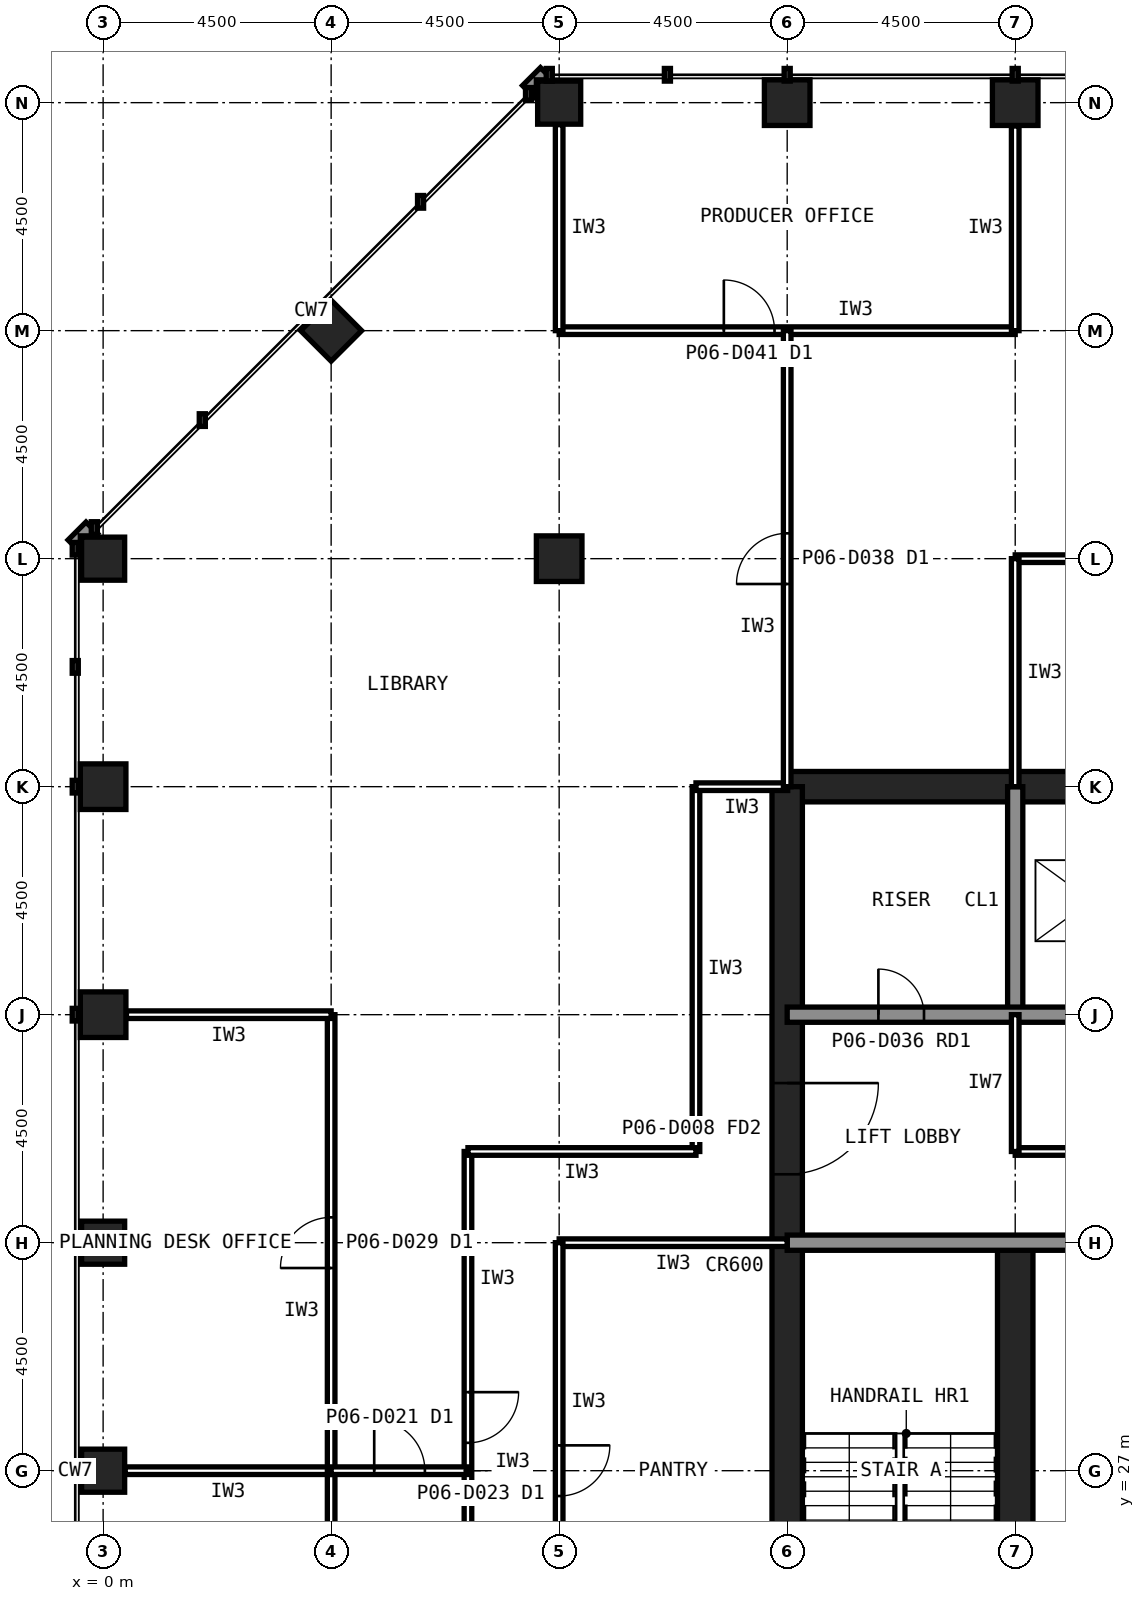
"""IFC4 building model, lengths in metres.
Left out: names, types, materials, properties, quantities, classifications, styles, units other than length and angle.
Written with IfcOpenShell. Run it as: python <this file> out.ifc"""

import sys

from ifc_helpers import new_model, si_unit, direction, frame, frame_2d, origin, origin_2d, place, context, subcontext, project, spatial, rectangle, hollow_rectangle, extrude, element, fill, save


model = new_model("IFC4")
c1 = context("Model", 3, precision=1e-05, world=origin(), true_north=direction((0.0, 1.0)))
c2 = subcontext(c1, "Body", "Model", "MODEL_VIEW")
j1 = project(units=[si_unit("LENGTHUNIT", "METRE"), si_unit("PLANEANGLEUNIT", "RADIAN")], contexts=[c1])
p1 = place(None, origin())
s1 = spatial("IfcSite", under=j1, at=p1, CompositionType="ELEMENT")
p2 = place(p1, origin())
s2 = spatial("IfcBuilding", under=s1, at=p2, CompositionType="ELEMENT")
p3 = place(p2, frame((0.0, 0.0, 29.0)))
s3 = spatial("IfcBuildingStorey", under=s2, at=p3, CompositionType="ELEMENT", Elevation=29.0)
for number, where, z_axis, x_axis in (
    (1, (18.0, 54.0, 0.0), (0.0, 0.0, 1.0), (1.0, 0.0, 0.0)),
    (2, (13.5, 54.0, 0.0), (0.0, 0.0, 1.0), (1.0, 0.0, 0.0)),
):
    element("IfcColumn", number, at=place(p3, frame(where, z_axis=z_axis, x_axis=x_axis)), inside=s3, PredefinedType="COLUMN", context=c2, shape_type="SweptSolid", body=[
        extrude(hollow_rectangle(XDim=0.9, YDim=0.9, WallThickness=0.063, at=origin_2d()), origin(), (0.0, 0.0, 1.0), 4.2),
    ])
for number, where, z_axis, x_axis in (
    (3, (9.0, 54.0, 0.0), (0.0, 0.0, 1.0), (1.0, 0.0, 0.0)),
    (4, (0.0, 45.0, 0.0), (0.0, 0.0, 1.0), (1.0, 0.0, 0.0)),
):
    element("IfcColumn", number, at=place(p3, frame(where, z_axis=z_axis, x_axis=x_axis)), inside=s3, PredefinedType="COLUMN", context=c2, shape_type="SweptSolid", body=[
        extrude(hollow_rectangle(XDim=0.85, YDim=0.85, WallThickness=0.05, at=origin_2d()), origin(), (0.0, 0.0, 1.0), 4.2),
    ])
for number, where, z_axis, x_axis in (
    (5, (0.0, 40.5, 0.0), (0.0, 0.0, 1.0), (1.0, 0.0, 0.0)),
    (6, (0.0, 36.0, 0.0), (0.0, 0.0, 1.0), (1.0, 0.0, 0.0)),
):
    element("IfcColumn", number, at=place(p3, frame(where, z_axis=z_axis, x_axis=x_axis)), inside=s3, PredefinedType="COLUMN", context=c2, shape_type="SweptSolid", body=[
        extrude(hollow_rectangle(XDim=0.9, YDim=0.9, WallThickness=0.063, at=origin_2d()), origin(), (0.0, 0.0, 1.0), 4.2),
    ])
for number, where, z_axis, x_axis in (
    (7, (0.0, 31.5, 0.0), (0.0, 0.0, 1.0), (1.0, 0.0, 0.0)),
    (8, (0.0, 27.0, 0.0), (0.0, 0.0, 1.0), (1.0, 0.0, 0.0)),
    (9, (4.5, 49.5, 0.0), (0.0, 0.0, 1.0), (0.707, 0.707, 0.0)),
):
    element("IfcColumn", number, at=place(p3, frame(where, z_axis=z_axis, x_axis=x_axis)), inside=s3, PredefinedType="COLUMN", context=c2, shape_type="SweptSolid", body=[
        extrude(hollow_rectangle(XDim=0.85, YDim=0.85, WallThickness=0.05, at=origin_2d()), origin(), (0.0, 0.0, 1.0), 4.2),
    ])
p4 = place(p3, frame((9.0, 45.0, 0.0), z_axis=(0.0, 0.0, 1.0), x_axis=(1.0, 0.0, 0.0)))
e10 = element("IfcColumn", 10, at=p4, inside=s3, PredefinedType="COLUMN", context=c2, shape_type="SweptSolid", body=[
    extrude(hollow_rectangle(XDim=0.9, YDim=0.9, WallThickness=0.063, at=origin_2d()), origin(), (0.0, 0.0, 1.0), 4.2),
])
p5 = place(p3, frame((40.5, 40.5, 0.0), z_axis=(0.0, 0.0, 1.0), x_axis=(-1.0, 0.0, 0.0)))
e11 = element("IfcWall", 11, at=p5, inside=s3, PredefinedType="SHEAR", context=c2, shape_type="SweptSolid", body=[
    extrude(rectangle(XDim=27.0, YDim=0.6, at=frame_2d((13.5, 0.0))), origin(), (0.0, 0.0, 1.0), 4.2),
])
p6 = place(p3, frame((13.5, 40.5, 0.0), z_axis=(0.0, 0.0, 1.0), x_axis=(0.0, -1.0, 0.0)))
e12 = element("IfcWall", 12, at=p6, inside=s3, PredefinedType="SHEAR", context=c2, shape_type="SweptSolid", body=[
    extrude(rectangle(XDim=27.0, YDim=0.6, at=frame_2d((13.5, 0.0))), origin(), (0.0, 0.0, 1.0), 4.2),
])
p7 = place(p6, frame((19.65, 0.0, 0.0)))
e13 = element("IfcOpeningElement", 13, at=p7, cuts=e12, PredefinedType="OPENING", context=c2, shape_type="SweptSolid", body=[
    extrude(rectangle(XDim=1.2, YDim=2.1, at=frame_2d((0.6, 1.05))), frame((0.0, 0.31, 0.0), z_axis=(0.0, -1.0, 0.0), x_axis=(1.0, 0.0, 0.0)), (0.0, 0.0, 1.0), 0.62),
])
p8 = place(p6, frame((5.85, 0.0, 0.0)))
e14 = element("IfcOpeningElement", 14, at=p8, cuts=e12, PredefinedType="OPENING", context=c2, shape_type="SweptSolid", body=[
    extrude(rectangle(XDim=1.8, YDim=2.1, at=frame_2d((0.9, 1.05))), frame((0.0, 0.31, 0.0), z_axis=(0.0, -1.0, 0.0), x_axis=(1.0, 0.0, 0.0)), (0.0, 0.0, 1.0), 0.62),
])
p9 = place(p3, frame((18.0, 13.5, 0.0), z_axis=(0.0, 0.0, 1.0), x_axis=(0.0, 1.0, 0.0)))
e15 = element("IfcWall", 15, at=p9, inside=s3, PredefinedType="SHEAR", context=c2, shape_type="SweptSolid", body=[
    extrude(rectangle(XDim=18.0, YDim=0.7, at=frame_2d((9.0, 0.0))), origin(), (0.0, 0.0, 1.0), 4.2),
])
p10 = place(p3, frame((18.0, 36.0, 0.0), z_axis=(0.0, 0.0, 1.0), x_axis=(0.0, 1.0, 0.0)))
e16 = element("IfcWall", 16, at=p10, inside=s3, PredefinedType="SOLIDWALL", context=c2, shape_type="SweptSolid", body=[
    extrude(rectangle(XDim=4.5, YDim=0.3, at=frame_2d((2.25, 0.0))), origin(), (0.0, 0.0, 1.0), 4.04),
])
p11 = place(p3, frame((13.5, 36.0, 0.0), z_axis=(0.0, 0.0, 1.0), x_axis=(1.0, 0.0, 0.0)))
e17 = element("IfcWall", 17, at=p11, inside=s3, PredefinedType="SOLIDWALL", context=c2, shape_type="SweptSolid", body=[
    extrude(rectangle(XDim=27.0, YDim=0.3, at=frame_2d((13.5, 0.0))), origin(), (0.0, 0.0, 1.0), 4.04),
])
p12 = place(p11, frame((1.8, 0.0, 0.0)))
e18 = element("IfcOpeningElement", 18, at=p12, cuts=e17, PredefinedType="OPENING", context=c2, shape_type="SweptSolid", body=[
    extrude(rectangle(XDim=0.9, YDim=2.1, at=frame_2d((0.45, 1.05))), frame((0.0, 0.16, 0.0), z_axis=(0.0, -1.0, 0.0), x_axis=(1.0, 0.0, 0.0)), (0.0, 0.0, 1.0), 0.32),
])
p13 = place(p11, frame((24.1, 0.0, 0.0)))
e19 = element("IfcOpeningElement", 19, at=p13, cuts=e17, PredefinedType="OPENING", context=c2, shape_type="SweptSolid", body=[
    extrude(rectangle(XDim=1.3, YDim=2.2, at=frame_2d((0.65, 1.1))), frame((0.0, 0.16, 0.0), z_axis=(0.0, -1.0, 0.0), x_axis=(1.0, 0.0, 0.0)), (0.0, 0.0, 1.0), 0.32),
])
p14 = place(p3, frame((13.5, 31.5, 0.0), z_axis=(0.0, 0.0, 1.0), x_axis=(1.0, 0.0, 0.0)))
e20 = element("IfcWall", 20, at=p14, inside=s3, PredefinedType="SOLIDWALL", context=c2, shape_type="SweptSolid", body=[
    extrude(rectangle(XDim=27.0, YDim=0.3, at=frame_2d((13.5, 0.0))), origin(), (0.0, 0.0, 1.0), 4.04),
])
p15 = place(p14, frame((24.15, 0.0, 0.0)))
e21 = element("IfcOpeningElement", 21, at=p15, cuts=e20, PredefinedType="OPENING", context=c2, shape_type="SweptSolid", body=[
    extrude(rectangle(XDim=1.2, YDim=2.1, at=frame_2d((0.6, 1.05))), frame((0.0, 0.16, 0.0), z_axis=(0.0, -1.0, 0.0), x_axis=(1.0, 0.0, 0.0)), (0.0, 0.0, 1.0), 0.32),
])
p16 = place(p14, frame((15.3, 0.0, 0.0)))
e22 = element("IfcOpeningElement", 22, at=p16, cuts=e20, PredefinedType="OPENING", context=c2, shape_type="SweptSolid", body=[
    extrude(rectangle(XDim=0.9, YDim=2.1, at=frame_2d((0.45, 1.05))), frame((0.0, 0.16, 0.0), z_axis=(0.0, -1.0, 0.0), x_axis=(1.0, 0.0, 0.0)), (0.0, 0.0, 1.0), 0.32),
])
p17 = place(p14, frame((19.8, 0.0, 0.0)))
e23 = element("IfcOpeningElement", 23, at=p17, cuts=e20, PredefinedType="OPENING", context=c2, shape_type="SweptSolid", body=[
    extrude(rectangle(XDim=0.9, YDim=2.1, at=frame_2d((0.45, 1.05))), frame((0.0, 0.16, 0.0), z_axis=(0.0, -1.0, 0.0), x_axis=(1.0, 0.0, 0.0)), (0.0, 0.0, 1.0), 0.32),
])
p18 = place(p3, frame((18.0, 33.3, 0.0), z_axis=(0.0, 0.0, 1.0), x_axis=(1.0, 0.0, 0.0)))
e24 = element("IfcWall", 24, at=p18, inside=s3, PredefinedType="PARTITIONING", context=c2, shape_type="SweptSolid", body=[
    extrude(rectangle(XDim=18.0, YDim=0.15, at=frame_2d((9.0, 0.0))), origin(), (0.0, 0.0, 1.0), 4.04),
])
p19 = place(p18, frame((5.55, 0.0, 0.0)))
e25 = element("IfcOpeningElement", 25, at=p19, cuts=e24, PredefinedType="OPENING", context=c2, shape_type="SweptSolid", body=[
    extrude(rectangle(XDim=0.9, YDim=2.1, at=frame_2d((0.45, 1.05))), frame((0.0, 0.085, 0.0), z_axis=(0.0, -1.0, 0.0), x_axis=(1.0, 0.0, 0.0)), (0.0, 0.0, 1.0), 0.17),
])
p20 = place(p18, frame((14.55, 0.0, 0.0)))
e26 = element("IfcOpeningElement", 26, at=p20, cuts=e24, PredefinedType="OPENING", context=c2, shape_type="SweptSolid", body=[
    extrude(rectangle(XDim=0.9, YDim=2.1, at=frame_2d((0.45, 1.05))), frame((0.0, 0.085, 0.0), z_axis=(0.0, -1.0, 0.0), x_axis=(1.0, 0.0, 0.0)), (0.0, 0.0, 1.0), 0.17),
])
p21 = place(p3, frame((18.0, 33.3, 0.0), z_axis=(0.0, 0.0, 1.0), x_axis=(0.0, 1.0, 0.0)))
e27 = element("IfcWall", 27, at=p21, inside=s3, PredefinedType="PARTITIONING", context=c2, shape_type="SweptSolid", body=[
    extrude(rectangle(XDim=2.7, YDim=0.15, at=frame_2d((1.35, 0.0))), origin(), (0.0, 0.0, 1.0), 4.04),
])
p22 = place(p3, frame((7.2, 33.3, 0.0), z_axis=(0.0, 0.0, 1.0), x_axis=(0.0, -1.0, 0.0)))
e28 = element("IfcWall", 28, at=p22, inside=s3, PredefinedType="PARTITIONING", context=c2, shape_type="SweptSolid", body=[
    extrude(rectangle(XDim=12.6, YDim=0.15, at=frame_2d((6.3, 0.0))), origin(), (0.0, 0.0, 1.0), 4.04),
])
p23 = place(p22, frame((4.75, 0.0, 0.0)))
e29 = element("IfcOpeningElement", 29, at=p23, cuts=e28, PredefinedType="OPENING", context=c2, shape_type="SweptSolid", body=[
    extrude(rectangle(XDim=1.0, YDim=2.1, at=frame_2d((0.5, 1.05))), frame((0.0, 0.085, 0.0), z_axis=(0.0, -1.0, 0.0), x_axis=(1.0, 0.0, 0.0)), (0.0, 0.0, 1.0), 0.17),
])
p24 = place(p3, frame((11.7, 40.5, 0.0), z_axis=(0.0, 0.0, 1.0), x_axis=(0.0, -1.0, 0.0)))
e30 = element("IfcWall", 30, at=p24, inside=s3, PredefinedType="PARTITIONING", context=c2, shape_type="SweptSolid", body=[
    extrude(rectangle(XDim=7.2, YDim=0.15, at=frame_2d((3.6, 0.0))), origin(), (0.0, 0.0, 1.0), 4.04),
])
p25 = place(p3, frame((11.7, 33.3, 0.0), z_axis=(0.0, 0.0, 1.0), x_axis=(-1.0, 0.0, 0.0)))
e31 = element("IfcWall", 31, at=p25, inside=s3, PredefinedType="PARTITIONING", context=c2, shape_type="SweptSolid", body=[
    extrude(rectangle(XDim=4.5, YDim=0.15, at=frame_2d((2.25, 0.0))), origin(), (0.0, 0.0, 1.0), 4.04),
])
p26 = place(p3, frame((13.51, 40.5, 0.0), z_axis=(0.0, 0.0, 1.0), x_axis=(-1.0, 0.0, 0.0)))
e32 = element("IfcWall", 32, at=p26, inside=s3, PredefinedType="PARTITIONING", context=c2, shape_type="SweptSolid", body=[
    extrude(rectangle(XDim=1.81, YDim=0.15, at=frame_2d((0.905, 0.0))), origin(), (0.0, 0.0, 1.0), 3.189),
])
p27 = place(p3, frame((27.0, 45.0, 0.0), z_axis=(0.0, 0.0, 1.0), x_axis=(-1.0, 0.0, 0.0)))
e33 = element("IfcWall", 33, at=p27, inside=s3, PredefinedType="PARTITIONING", context=c2, shape_type="SweptSolid", body=[
    extrude(rectangle(XDim=9.0, YDim=0.15, at=frame_2d((4.5, 0.0))), origin(), (0.0, 0.0, 1.0), 4.04),
])
p28 = place(p27, frame((4.0, 0.0, 0.0)))
e34 = element("IfcOpeningElement", 34, at=p28, cuts=e33, PredefinedType="OPENING", context=c2, shape_type="SweptSolid", body=[
    extrude(rectangle(XDim=1.0, YDim=2.1, at=frame_2d((0.5, 1.05))), frame((0.0, 0.085, 0.0), z_axis=(0.0, -1.0, 0.0), x_axis=(1.0, 0.0, 0.0)), (0.0, 0.0, 1.0), 0.17),
])
p29 = place(p3, frame((18.0, 45.0, 0.0), z_axis=(0.0, 0.0, 1.0), x_axis=(0.0, -1.0, 0.0)))
e35 = element("IfcWall", 35, at=p29, inside=s3, PredefinedType="PARTITIONING", context=c2, shape_type="SweptSolid", body=[
    extrude(rectangle(XDim=4.5, YDim=0.15, at=frame_2d((2.25, 0.0))), origin(), (0.0, 0.0, 1.0), 3.189),
])
p30 = place(p3, frame((4.5, 22.5, 0.0), z_axis=(0.0, 0.0, 1.0), x_axis=(0.0, 1.0, 0.0)))
e36 = element("IfcWall", 36, at=p30, inside=s3, PredefinedType="PARTITIONING", context=c2, shape_type="SweptSolid", body=[
    extrude(rectangle(XDim=4.5, YDim=0.15, at=frame_2d((2.25, 0.0))), origin(), (0.0, 0.0, 1.0), 4.04),
])
p31 = place(p30, frame((1.75, 0.0, 0.0)))
e37 = element("IfcOpeningElement", 37, at=p31, cuts=e36, PredefinedType="OPENING", context=c2, shape_type="SweptSolid", body=[
    extrude(rectangle(XDim=1.0, YDim=2.1, at=frame_2d((0.5, 1.05))), frame((0.0, 0.085, 0.0), z_axis=(0.0, -1.0, 0.0), x_axis=(1.0, 0.0, 0.0)), (0.0, 0.0, 1.0), 0.17),
])
p32 = place(p3, frame((4.5, 27.0, 0.0), z_axis=(0.0, 0.0, 1.0), x_axis=(-1.0, 0.0, 0.0)))
e38 = element("IfcWall", 38, at=p32, inside=s3, PredefinedType="PARTITIONING", context=c2, shape_type="SweptSolid", body=[
    extrude(rectangle(XDim=4.065, YDim=0.15, at=frame_2d((2.032, 0.0))), origin(), (0.0, 0.0, 1.0), 3.189),
])
p33 = place(p3, frame((4.5, 27.0, 0.0), z_axis=(0.0, 0.0, 1.0), x_axis=(0.0, 1.0, 0.0)))
e39 = element("IfcWall", 39, at=p33, inside=s3, PredefinedType="PARTITIONING", context=c2, shape_type="SweptSolid", body=[
    extrude(rectangle(XDim=9.0, YDim=0.15, at=frame_2d((4.5, 0.0))), origin(), (0.0, 0.0, 1.0), 4.04),
])
p34 = place(p33, frame((4.0, 0.0, 0.0)))
e40 = element("IfcOpeningElement", 40, at=p34, cuts=e39, PredefinedType="OPENING", context=c2, shape_type="SweptSolid", body=[
    extrude(rectangle(XDim=1.0, YDim=2.1, at=frame_2d((0.5, 1.05))), frame((0.0, 0.085, 0.0), z_axis=(0.0, -1.0, 0.0), x_axis=(1.0, 0.0, 0.0)), (0.0, 0.0, 1.0), 0.17),
])
p35 = place(p3, frame((4.5, 36.0, 0.0), z_axis=(0.0, 0.0, 1.0), x_axis=(-1.0, 0.0, 0.0)))
e41 = element("IfcWall", 41, at=p35, inside=s3, PredefinedType="PARTITIONING", context=c2, shape_type="SweptSolid", body=[
    extrude(rectangle(XDim=4.04, YDim=0.15, at=frame_2d((2.02, 0.0))), origin(), (0.0, 0.0, 1.0), 3.189),
])
p36 = place(p3, frame((9.0, 49.5, 0.0), z_axis=(0.0, 0.0, 1.0), x_axis=(1.0, 0.0, 0.0)))
e42 = element("IfcWall", 42, at=p36, inside=s3, PredefinedType="PARTITIONING", context=c2, shape_type="SweptSolid", body=[
    extrude(rectangle(XDim=9.0, YDim=0.15, at=frame_2d((4.5, 0.0))), origin(), (0.0, 0.0, 1.0), 4.04),
])
p37 = place(p36, frame((3.25, 0.0, 0.0)))
e43 = element("IfcOpeningElement", 43, at=p37, cuts=e42, PredefinedType="OPENING", context=c2, shape_type="SweptSolid", body=[
    extrude(rectangle(XDim=1.0, YDim=2.1, at=frame_2d((0.5, 1.05))), frame((0.0, 0.085, 0.0), z_axis=(0.0, -1.0, 0.0), x_axis=(1.0, 0.0, 0.0)), (0.0, 0.0, 1.0), 0.17),
])
p38 = place(p3, frame((18.0, 49.5, 0.0), z_axis=(0.0, 0.0, 1.0), x_axis=(0.0, 1.0, 0.0)))
e44 = element("IfcWall", 44, at=p38, inside=s3, PredefinedType="PARTITIONING", context=c2, shape_type="SweptSolid", body=[
    extrude(rectangle(XDim=4.04, YDim=0.15, at=frame_2d((2.02, 0.0))), origin(), (0.0, 0.0, 1.0), 3.189),
])
p39 = place(p3, frame((9.0, 53.565, 0.0), z_axis=(0.0, 0.0, 1.0), x_axis=(0.0, -1.0, 0.0)))
e45 = element("IfcWall", 45, at=p39, inside=s3, PredefinedType="PARTITIONING", context=c2, shape_type="SweptSolid", body=[
    extrude(rectangle(XDim=4.065, YDim=0.15, at=frame_2d((2.032, 0.0))), origin(), (0.0, 0.0, 1.0), 3.429),
])
p40 = place(p3, frame((13.5, 31.5, 0.0), z_axis=(0.0, 0.0, 1.0), x_axis=(-1.0, 0.0, 0.0)))
e46 = element("IfcWall", 46, at=p40, inside=s3, PredefinedType="PARTITIONING", context=c2, shape_type="SweptSolid", body=[
    extrude(rectangle(XDim=4.5, YDim=0.15, at=frame_2d((2.25, 0.0))), origin(), (0.0, 0.0, 1.0), 3.189),
])
p41 = place(p3, frame((9.0, 31.5, 0.0), z_axis=(0.0, 0.0, 1.0), x_axis=(0.0, -1.0, 0.0)))
e47 = element("IfcWall", 47, at=p41, inside=s3, PredefinedType="PARTITIONING", context=c2, shape_type="SweptSolid", body=[
    extrude(rectangle(XDim=9.0, YDim=0.15, at=frame_2d((4.5, 0.0))), origin(), (0.0, 0.0, 1.0), 4.04),
])
p42 = place(p41, frame((4.0, 0.0, 0.0)))
e48 = element("IfcOpeningElement", 48, at=p42, cuts=e47, PredefinedType="OPENING", context=c2, shape_type="SweptSolid", body=[
    extrude(rectangle(XDim=1.0, YDim=2.1, at=frame_2d((0.5, 1.05))), frame((0.0, 0.085, 0.0), z_axis=(0.0, -1.0, 0.0), x_axis=(1.0, 0.0, 0.0)), (0.0, 0.0, 1.0), 0.17),
])
p43 = place(p3, frame((13.5, 40.5, 0.0), z_axis=(0.0, 0.0, 1.0), x_axis=(0.0, 1.0, 0.0)))
e49 = element("IfcWall", 49, at=p43, inside=s3, PredefinedType="PARTITIONING", context=c2, shape_type="SweptSolid", body=[
    extrude(rectangle(XDim=9.0, YDim=0.15, at=frame_2d((4.5, 0.0))), origin(), (0.0, 0.0, 1.0), 3.189),
])
p44 = place(p43, frame((4.0, 0.0, 0.0)))
e50 = element("IfcOpeningElement", 50, at=p44, cuts=e49, PredefinedType="OPENING", context=c2, shape_type="SweptSolid", body=[
    extrude(rectangle(XDim=1.0, YDim=2.1, at=frame_2d((0.5, 1.05))), frame((0.0, 0.085, 0.0), z_axis=(0.0, -1.0, 0.0), x_axis=(1.0, 0.0, 0.0)), (0.0, 0.0, 1.0), 0.17),
])
p45 = place(p3, frame((4.5, 27.0, 0.0), z_axis=(0.0, 0.0, 1.0), x_axis=(1.0, 0.0, 0.0)))
e51 = element("IfcWall", 51, at=p45, inside=s3, PredefinedType="PARTITIONING", context=c2, shape_type="SweptSolid", body=[
    extrude(rectangle(XDim=2.7, YDim=0.15, at=frame_2d((1.35, 0.0))), origin(), (0.0, 0.0, 1.0), 3.189),
])
p46 = place(p45, frame((0.85, 0.0, 0.0)))
e52 = element("IfcOpeningElement", 52, at=p46, cuts=e51, PredefinedType="OPENING", context=c2, shape_type="SweptSolid", body=[
    extrude(rectangle(XDim=1.0, YDim=2.1, at=frame_2d((0.5, 1.05))), frame((0.0, 0.085, 0.0), z_axis=(0.0, -1.0, 0.0), x_axis=(1.0, 0.0, 0.0)), (0.0, 0.0, 1.0), 0.17),
])
p47 = place(p8, origin())
e53 = element("IfcDoor", 53, at=p47, inside=s3, OperationType="SINGLE_SWING_LEFT", PredefinedType="DOOR", context=c2, shape_type="SweptSolid", body=[
    extrude(rectangle(XDim=1.8, YDim=2.1, at=frame_2d((0.9, 1.05))), frame((0.0, 0.025, 0.0), z_axis=(0.0, -1.0, 0.0), x_axis=(1.0, 0.0, 0.0)), (0.0, 0.0, 1.0), 0.05),
])
fill(e14, e53)
p48 = place(p12, origin())
e54 = element("IfcDoor", 54, at=p48, inside=s3, OperationType="SINGLE_SWING_LEFT", PredefinedType="DOOR", context=c2, shape_type="SweptSolid", body=[
    extrude(rectangle(XDim=0.9, YDim=2.1, at=frame_2d((0.45, 1.05))), frame((0.0, 0.025, 0.0), z_axis=(0.0, -1.0, 0.0), x_axis=(1.0, 0.0, 0.0)), (0.0, 0.0, 1.0), 0.05),
])
fill(e18, e54)
p49 = place(p23, origin())
e55 = element("IfcDoor", 55, at=p49, inside=s3, OperationType="SINGLE_SWING_LEFT", PredefinedType="DOOR", context=c2, shape_type="SweptSolid", body=[
    extrude(rectangle(XDim=1.0, YDim=2.1, at=frame_2d((0.5, 1.05))), frame((0.0, 0.025, 0.0), z_axis=(0.0, -1.0, 0.0), x_axis=(1.0, 0.0, 0.0)), (0.0, 0.0, 1.0), 0.05),
])
fill(e29, e55)
p50 = place(p34, origin())
e56 = element("IfcDoor", 56, at=p50, inside=s3, OperationType="SINGLE_SWING_LEFT", PredefinedType="DOOR", context=c2, shape_type="SweptSolid", body=[
    extrude(rectangle(XDim=1.0, YDim=2.1, at=frame_2d((0.5, 1.05))), frame((0.0, 0.025, 0.0), z_axis=(0.0, -1.0, 0.0), x_axis=(1.0, 0.0, 0.0)), (0.0, 0.0, 1.0), 0.05),
])
fill(e40, e56)
p51 = place(p37, origin())
e57 = element("IfcDoor", 57, at=p51, inside=s3, OperationType="SINGLE_SWING_LEFT", PredefinedType="DOOR", context=c2, shape_type="SweptSolid", body=[
    extrude(rectangle(XDim=1.0, YDim=2.1, at=frame_2d((0.5, 1.05))), frame((0.0, 0.025, 0.0), z_axis=(0.0, -1.0, 0.0), x_axis=(1.0, 0.0, 0.0)), (0.0, 0.0, 1.0), 0.05),
])
fill(e43, e57)
p52 = place(p42, origin())
e58 = element("IfcDoor", 58, at=p52, inside=s3, OperationType="SINGLE_SWING_LEFT", PredefinedType="DOOR", context=c2, shape_type="SweptSolid", body=[
    extrude(rectangle(XDim=1.0, YDim=2.1, at=frame_2d((0.5, 1.05))), frame((0.0, 0.025, 0.0), z_axis=(0.0, -1.0, 0.0), x_axis=(1.0, 0.0, 0.0)), (0.0, 0.0, 1.0), 0.05),
])
fill(e48, e58)
p53 = place(p44, origin())
e59 = element("IfcDoor", 59, at=p53, inside=s3, OperationType="SINGLE_SWING_LEFT", PredefinedType="DOOR", context=c2, shape_type="SweptSolid", body=[
    extrude(rectangle(XDim=1.0, YDim=2.1, at=frame_2d((0.5, 1.05))), frame((0.0, 0.025, 0.0), z_axis=(0.0, -1.0, 0.0), x_axis=(1.0, 0.0, 0.0)), (0.0, 0.0, 1.0), 0.05),
])
fill(e50, e59)
p54 = place(p46, origin())
e60 = element("IfcDoor", 60, at=p54, inside=s3, OperationType="SINGLE_SWING_LEFT", PredefinedType="DOOR", context=c2, shape_type="SweptSolid", body=[
    extrude(rectangle(XDim=1.0, YDim=2.1, at=frame_2d((0.5, 1.05))), frame((0.0, 0.025, 0.0), z_axis=(0.0, -1.0, 0.0), x_axis=(1.0, 0.0, 0.0)), (0.0, 0.0, 1.0), 0.05),
])
fill(e52, e60)
save(model, sys.argv[1])
